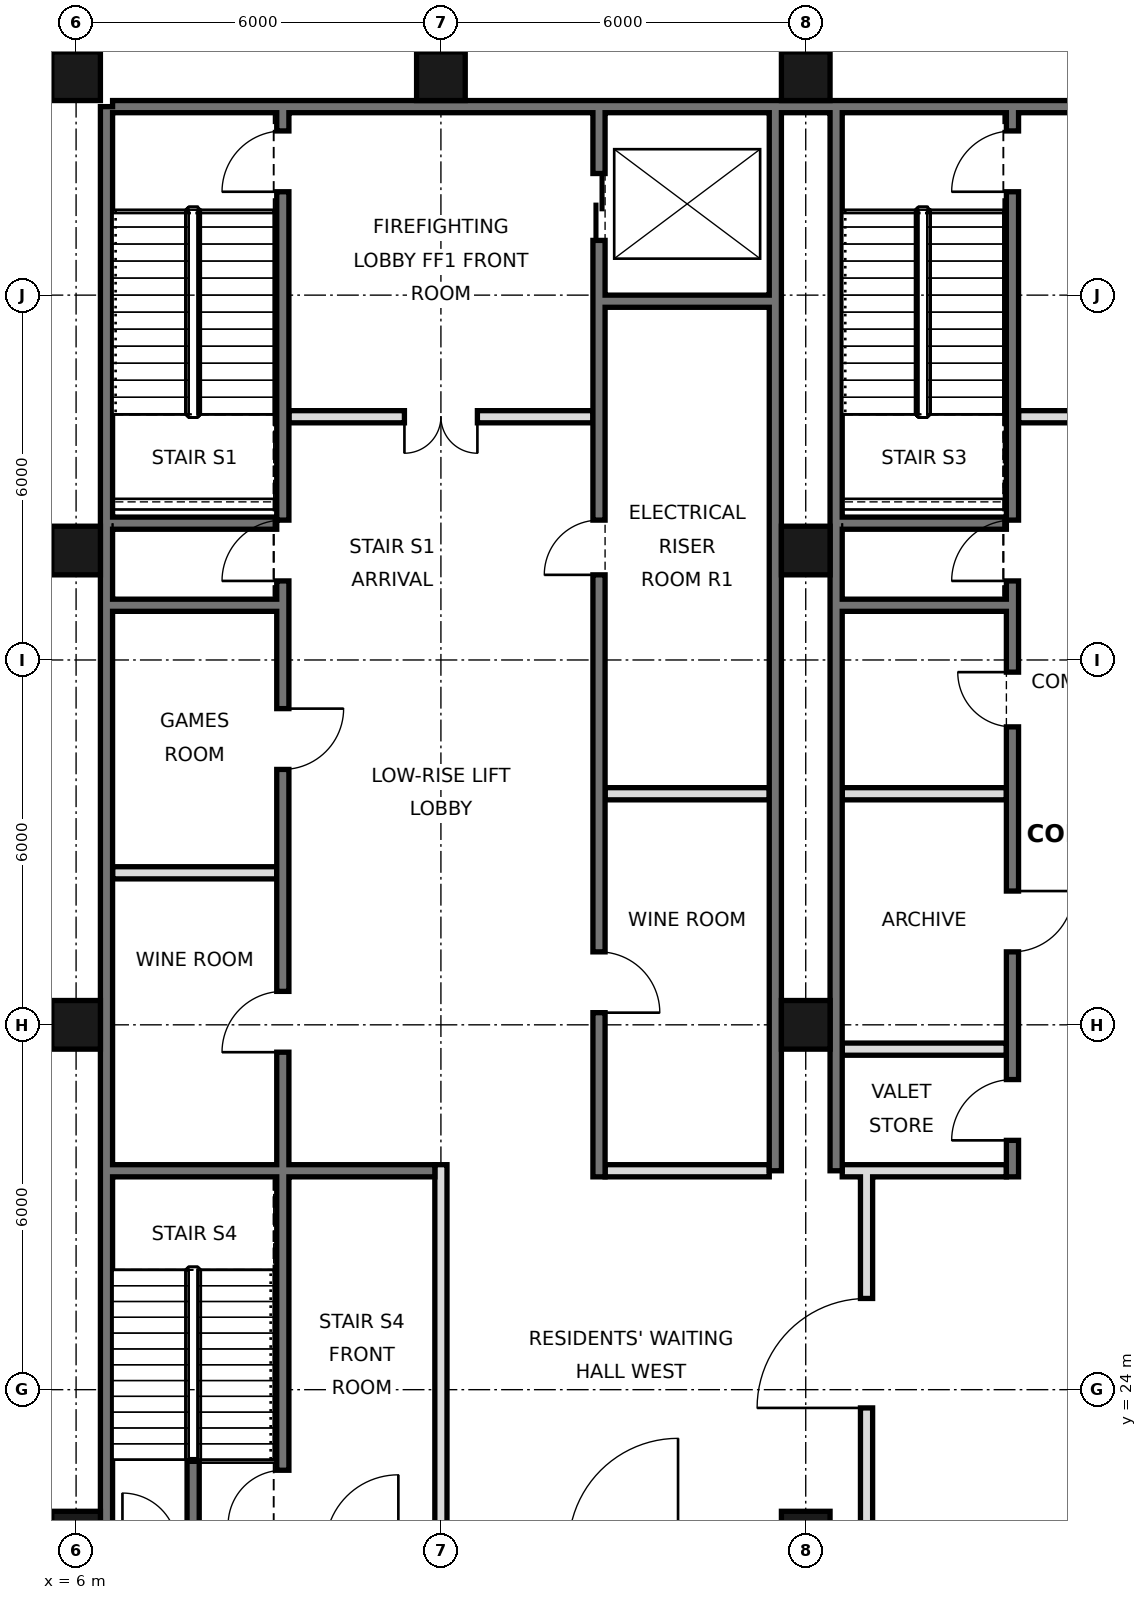
"""IFC4 building model, lengths in metres.
Left out: names, types, materials, properties, quantities, classifications, styles, units other than length and angle.
Written with IfcOpenShell. Run it as: python <this file> out.ifc"""

import sys

from ifc_helpers import new_model, si_unit, direction, frame, frame_2d, origin, origin_2d, place, context, subcontext, project, spatial, rectangle, hollow_rectangle, extrude, element, fill, save


model = new_model("IFC4")
c1 = context("Model", 3, precision=1e-05, world=origin(), true_north=direction((0.0, 1.0)))
c2 = subcontext(c1, "Body", "Model", "MODEL_VIEW")
j1 = project(units=[si_unit("LENGTHUNIT", "METRE"), si_unit("PLANEANGLEUNIT", "RADIAN")], contexts=[c1])
p1 = place(None, origin())
s1 = spatial("IfcSite", under=j1, at=p1, CompositionType="ELEMENT")
p2 = place(p1, origin())
s2 = spatial("IfcBuilding", under=s1, at=p2, CompositionType="ELEMENT")
p3 = place(p2, frame((0.0, 0.0, 281.8)))
s3 = spatial("IfcBuildingStorey", under=s2, at=p3, CompositionType="ELEMENT", Elevation=281.8)
for number, where, z_axis, x_axis in (
    (1, (6.0, 21.6, 0.0), (0.0, 0.0, 1.0), (1.0, 0.0, 0.0)),
    (2, (6.0, 30.0, 0.0), (0.0, 0.0, 1.0), (1.0, 0.0, 0.0)),
    (3, (6.0, 37.8, 0.0), (0.0, 0.0, 1.0), (1.0, 0.0, 0.0)),
    (4, (6.0, 45.6, 0.0), (0.0, 0.0, 1.0), (1.0, 0.0, 0.0)),
    (5, (12.0, 45.6, 0.0), (0.0, 0.0, 1.0), (1.0, 0.0, 0.0)),
    (6, (18.0, 21.6, 0.0), (0.0, 0.0, 1.0), (1.0, 0.0, 0.0)),
    (7, (18.0, 30.0, 0.0), (0.0, 0.0, 1.0), (1.0, 0.0, 0.0)),
    (8, (18.0, 37.8, 0.0), (0.0, 0.0, 1.0), (1.0, 0.0, 0.0)),
    (9, (18.0, 45.6, 0.0), (0.0, 0.0, 1.0), (1.0, 0.0, 0.0)),
):
    element("IfcColumn", number, at=place(p3, frame(where, z_axis=z_axis, x_axis=x_axis)), inside=s3, PredefinedType="COLUMN", context=c2, shape_type="SweptSolid", body=[
        extrude(hollow_rectangle(XDim=0.8, YDim=0.8, WallThickness=0.032, at=origin_2d()), origin(), (0.0, 0.0, 1.0), 9.0),
    ])
p4 = place(p3, frame((6.5, 21.6, 0.0), z_axis=(0.0, 0.0, 1.0), x_axis=(0.0, 1.0, 0.0)))
e10 = element("IfcWall", 10, at=p4, inside=s3, PredefinedType="SOLIDWALL", context=c2, shape_type="SweptSolid", body=[
    extrude(rectangle(XDim=23.5, YDim=0.2, at=frame_2d((11.75, 0.0))), origin(), (0.0, 0.0, 1.0), 8.7),
])
p5 = place(p3, frame((6.6, 45.1, 0.0), z_axis=(0.0, 0.0, 1.0), x_axis=(1.0, 0.0, 0.0)))
e11 = element("IfcWall", 11, at=p5, inside=s3, PredefinedType="SOLIDWALL", context=c2, shape_type="SweptSolid", body=[
    extrude(rectangle(XDim=34.8, YDim=0.2, at=frame_2d((17.4, 0.0))), origin(), (0.0, 0.0, 1.0), 8.7),
])
for number, where, z_axis, x_axis in (
    (12, (17.5, 27.6, 0.0), (0.0, 0.0, 1.0), (0.0, 1.0, 0.0)),
    (13, (18.5, 27.6, 0.0), (0.0, 0.0, 1.0), (0.0, 1.0, 0.0)),
):
    element("IfcWall", number, at=place(p3, frame(where, z_axis=z_axis, x_axis=x_axis)), inside=s3, PredefinedType="SOLIDWALL", context=c2, shape_type="SweptSolid", body=[
        extrude(rectangle(XDim=17.5, YDim=0.2, at=frame_2d((8.75, 0.0))), origin(), (0.0, 0.0, 1.0), 8.7),
    ])
p6 = place(p3, frame((19.0, 21.6, 0.0), z_axis=(0.0, 0.0, 1.0), x_axis=(0.0, 1.0, 0.0)))
e14 = element("IfcWall", 14, at=p6, inside=s3, PredefinedType="PARTITIONING", context=c2, shape_type="SweptSolid", body=[
    extrude(rectangle(XDim=6.0, YDim=0.2, at=frame_2d((3.0, 0.0))), origin(), (0.0, 0.0, 1.0), 8.7),
])
p7 = place(p6, frame((2.1, 0.0, 0.0)))
e15 = element("IfcOpeningElement", 15, at=p7, cuts=e14, PredefinedType="OPENING", context=c2, shape_type="SweptSolid", body=[
    extrude(rectangle(XDim=1.8, YDim=2.1, at=frame_2d((0.9, 1.05))), frame((0.0, 0.11, 0.0), z_axis=(0.0, -1.0, 0.0), x_axis=(1.0, 0.0, 0.0)), (0.0, 0.0, 1.0), 0.22),
])
p8 = place(p3, frame((12.0, 21.6, 0.0), z_axis=(0.0, 0.0, 1.0), x_axis=(0.0, 1.0, 0.0)))
e16 = element("IfcWall", 16, at=p8, inside=s3, PredefinedType="PARTITIONING", context=c2, shape_type="SweptSolid", body=[
    extrude(rectangle(XDim=6.1, YDim=0.2, at=frame_2d((3.05, 0.0))), origin(), (0.0, 0.0, 1.0), 8.7),
])
p9 = place(p3, frame((14.6, 27.5, 0.0), z_axis=(0.0, 0.0, 1.0), x_axis=(0.0, 1.0, 0.0)))
e17 = element("IfcWall", 17, at=p9, inside=s3, PredefinedType="SOLIDWALL", context=c2, shape_type="SweptSolid", body=[
    extrude(rectangle(XDim=17.5, YDim=0.2, at=frame_2d((8.75, 0.0))), origin(), (0.0, 0.0, 1.0), 8.7),
])
p10 = place(p9, frame((15.4, 0.0, 0.0)))
e18 = element("IfcOpeningElement", 18, at=p10, cuts=e17, PredefinedType="OPENING", context=c2, shape_type="SweptSolid", body=[
    extrude(rectangle(XDim=1.1, YDim=2.1, at=frame_2d((0.55, 1.05))), frame((0.0, 0.11, 0.0), z_axis=(0.0, -1.0, 0.0), x_axis=(1.0, 0.0, 0.0)), (0.0, 0.0, 1.0), 0.22),
])
p11 = place(p9, frame((2.7, 0.0, 0.0)))
e19 = element("IfcOpeningElement", 19, at=p11, cuts=e17, PredefinedType="OPENING", context=c2, shape_type="SweptSolid", body=[
    extrude(rectangle(XDim=1.0, YDim=2.1, at=frame_2d((0.5, 1.05))), frame((0.0, 0.11, 0.0), z_axis=(0.0, -1.0, 0.0), x_axis=(1.0, 0.0, 0.0)), (0.0, 0.0, 1.0), 0.22),
])
p12 = place(p9, frame((9.9, 0.0, 0.0)))
e20 = element("IfcOpeningElement", 20, at=p12, cuts=e17, PredefinedType="OPENING", context=c2, shape_type="SweptSolid", body=[
    extrude(rectangle(XDim=0.9, YDim=2.1, at=frame_2d((0.45, 1.05))), frame((0.0, 0.11, 0.0), z_axis=(0.0, -1.0, 0.0), x_axis=(1.0, 0.0, 0.0)), (0.0, 0.0, 1.0), 0.22),
])
p13 = place(p3, frame((21.4, 27.5, 0.0), z_axis=(0.0, 0.0, 1.0), x_axis=(0.0, 1.0, 0.0)))
e21 = element("IfcWall", 21, at=p13, inside=s3, PredefinedType="SOLIDWALL", context=c2, shape_type="SweptSolid", body=[
    extrude(rectangle(XDim=17.5, YDim=0.2, at=frame_2d((8.75, 0.0))), origin(), (0.0, 0.0, 1.0), 8.7),
])
p14 = place(p13, frame((0.6, 0.0, 0.0)))
e22 = element("IfcOpeningElement", 22, at=p14, cuts=e21, PredefinedType="OPENING", context=c2, shape_type="SweptSolid", body=[
    extrude(rectangle(XDim=1.0, YDim=2.1, at=frame_2d((0.5, 1.05))), frame((0.0, 0.11, 0.0), z_axis=(0.0, -1.0, 0.0), x_axis=(1.0, 0.0, 0.0)), (0.0, 0.0, 1.0), 0.22),
])
p15 = place(p13, frame((3.7, 0.0, 0.0)))
e23 = element("IfcOpeningElement", 23, at=p15, cuts=e21, PredefinedType="OPENING", context=c2, shape_type="SweptSolid", body=[
    extrude(rectangle(XDim=1.0, YDim=2.1, at=frame_2d((0.5, 1.05))), frame((0.0, 0.11, 0.0), z_axis=(0.0, -1.0, 0.0), x_axis=(1.0, 0.0, 0.0)), (0.0, 0.0, 1.0), 0.22),
])
p16 = place(p13, frame((9.8, 0.0, 0.0)))
e24 = element("IfcOpeningElement", 24, at=p16, cuts=e21, PredefinedType="OPENING", context=c2, shape_type="SweptSolid", body=[
    extrude(rectangle(XDim=1.0, YDim=2.1, at=frame_2d((0.5, 1.05))), frame((0.0, 0.11, 0.0), z_axis=(0.0, -1.0, 0.0), x_axis=(1.0, 0.0, 0.0)), (0.0, 0.0, 1.0), 0.22),
])
p17 = place(p13, frame((16.2, 0.0, 0.0)))
e25 = element("IfcOpeningElement", 25, at=p17, cuts=e21, PredefinedType="OPENING", context=c2, shape_type="SweptSolid", body=[
    extrude(rectangle(XDim=1.0, YDim=2.1, at=frame_2d((0.5, 1.05))), frame((0.0, 0.11, 0.0), z_axis=(0.0, -1.0, 0.0), x_axis=(1.0, 0.0, 0.0)), (0.0, 0.0, 1.0), 0.22),
])
p18 = place(p13, frame((7.4, 0.0, 0.0)))
e26 = element("IfcOpeningElement", 26, at=p18, cuts=e21, PredefinedType="OPENING", context=c2, shape_type="SweptSolid", body=[
    extrude(rectangle(XDim=0.9, YDim=2.1, at=frame_2d((0.45, 1.05))), frame((0.0, 0.11, 0.0), z_axis=(0.0, -1.0, 0.0), x_axis=(1.0, 0.0, 0.0)), (0.0, 0.0, 1.0), 0.22),
])
p19 = place(p3, frame((7.925, 21.6, 0.0), z_axis=(0.0, 0.0, 1.0), x_axis=(0.0, 1.0, 0.0)))
e27 = element("IfcWall", 27, at=p19, inside=s3, PredefinedType="SOLIDWALL", context=c2, shape_type="SweptSolid", body=[
    extrude(rectangle(XDim=1.25, YDim=0.2, at=frame_2d((0.625, 0.0))), origin(), (0.0, 0.0, 1.0), 8.7),
])
p20 = place(p3, frame((9.4, 21.6, 0.0), z_axis=(0.0, 0.0, 1.0), x_axis=(0.0, 1.0, 0.0)))
e28 = element("IfcWall", 28, at=p20, inside=s3, PredefinedType="SOLIDWALL", context=c2, shape_type="SweptSolid", body=[
    extrude(rectangle(XDim=23.4, YDim=0.2, at=frame_2d((11.7, 0.0))), origin(), (0.0, 0.0, 1.0), 8.7),
])
p21 = place(p20, frame((7.95, 0.0, 0.0)))
e29 = element("IfcOpeningElement", 29, at=p21, cuts=e28, PredefinedType="OPENING", context=c2, shape_type="SweptSolid", body=[
    extrude(rectangle(XDim=1.0, YDim=2.1, at=frame_2d((0.5, 1.05))), frame((0.0, 0.11, 0.0), z_axis=(0.0, -1.0, 0.0), x_axis=(1.0, 0.0, 0.0)), (0.0, 0.0, 1.0), 0.22),
])
p22 = place(p20, frame((12.6, 0.0, 0.0)))
e30 = element("IfcOpeningElement", 30, at=p22, cuts=e28, PredefinedType="OPENING", context=c2, shape_type="SweptSolid", body=[
    extrude(rectangle(XDim=1.0, YDim=2.1, at=frame_2d((0.5, 1.05))), frame((0.0, 0.11, 0.0), z_axis=(0.0, -1.0, 0.0), x_axis=(1.0, 0.0, 0.0)), (0.0, 0.0, 1.0), 0.22),
])
p23 = place(p20, frame((15.7, 0.0, 0.0)))
e31 = element("IfcOpeningElement", 31, at=p23, cuts=e28, PredefinedType="OPENING", context=c2, shape_type="SweptSolid", body=[
    extrude(rectangle(XDim=1.0, YDim=2.1, at=frame_2d((0.5, 1.05))), frame((0.0, 0.11, 0.0), z_axis=(0.0, -1.0, 0.0), x_axis=(1.0, 0.0, 0.0)), (0.0, 0.0, 1.0), 0.22),
])
p24 = place(p20, frame((22.1, 0.0, 0.0)))
e32 = element("IfcOpeningElement", 32, at=p24, cuts=e28, PredefinedType="OPENING", context=c2, shape_type="SweptSolid", body=[
    extrude(rectangle(XDim=1.0, YDim=2.1, at=frame_2d((0.5, 1.05))), frame((0.0, 0.11, 0.0), z_axis=(0.0, -1.0, 0.0), x_axis=(1.0, 0.0, 0.0)), (0.0, 0.0, 1.0), 0.22),
])
p25 = place(p20, frame((0.175, 0.0, 0.0)))
e33 = element("IfcOpeningElement", 33, at=p25, cuts=e28, PredefinedType="OPENING", context=c2, shape_type="SweptSolid", body=[
    extrude(rectangle(XDim=0.9, YDim=2.1, at=frame_2d((0.45, 1.05))), frame((0.0, 0.11, 0.0), z_axis=(0.0, -1.0, 0.0), x_axis=(1.0, 0.0, 0.0)), (0.0, 0.0, 1.0), 0.22),
])
for number, where, z_axis, x_axis in (
    (34, (14.7, 27.6, 0.0), (0.0, 0.0, 1.0), (1.0, 0.0, 0.0)),
    (35, (18.6, 27.6, 0.0), (0.0, 0.0, 1.0), (1.0, 0.0, 0.0)),
):
    element("IfcWall", number, at=place(p3, frame(where, z_axis=z_axis, x_axis=x_axis)), inside=s3, PredefinedType="PARTITIONING", context=c2, shape_type="SweptSolid", body=[
        extrude(rectangle(XDim=2.7, YDim=0.2, at=frame_2d((1.35, 0.0))), origin(), (0.0, 0.0, 1.0), 8.7),
    ])
p26 = place(p3, frame((6.6, 27.6, 0.0), z_axis=(0.0, 0.0, 1.0), x_axis=(1.0, 0.0, 0.0)))
e36 = element("IfcWall", 36, at=p26, inside=s3, PredefinedType="SOLIDWALL", context=c2, shape_type="SweptSolid", body=[
    extrude(rectangle(XDim=5.3, YDim=0.2, at=frame_2d((2.65, 0.0))), origin(), (0.0, 0.0, 1.0), 8.7),
])
for number, where, z_axis, x_axis in (
    (37, (18.6, 29.6, 0.0), (0.0, 0.0, 1.0), (1.0, 0.0, 0.0)),
    (38, (6.6, 32.5, 0.0), (0.0, 0.0, 1.0), (1.0, 0.0, 0.0)),
):
    element("IfcWall", number, at=place(p3, frame(where, z_axis=z_axis, x_axis=x_axis)), inside=s3, PredefinedType="PARTITIONING", context=c2, shape_type="SweptSolid", body=[
        extrude(rectangle(XDim=2.7, YDim=0.2, at=frame_2d((1.35, 0.0))), origin(), (0.0, 0.0, 1.0), 8.7),
    ])
for number, where, z_axis, x_axis in (
    (39, (14.7, 33.8, 0.0), (0.0, 0.0, 1.0), (1.0, 0.0, 0.0)),
    (40, (18.6, 33.8, 0.0), (0.0, 0.0, 1.0), (1.0, 0.0, 0.0)),
    (41, (18.6, 36.9, 0.0), (0.0, 0.0, 1.0), (1.0, 0.0, 0.0)),
    (42, (6.6, 36.9, 0.0), (0.0, 0.0, 1.0), (1.0, 0.0, 0.0)),
):
    element("IfcWall", number, at=place(p3, frame(where, z_axis=z_axis, x_axis=x_axis)), inside=s3, PredefinedType="SOLIDWALL", context=c2, shape_type="SweptSolid", body=[
        extrude(rectangle(XDim=2.7, YDim=0.2, at=frame_2d((1.35, 0.0))), origin(), (0.0, 0.0, 1.0), 8.7),
    ])
for number, where, z_axis, x_axis in (
    (43, (18.6, 38.25, 0.0), (0.0, 0.0, 1.0), (1.0, 0.0, 0.0)),
    (44, (6.6, 38.25, 0.0), (0.0, 0.0, 1.0), (1.0, 0.0, 0.0)),
):
    element("IfcWall", number, at=place(p3, frame(where, z_axis=z_axis, x_axis=x_axis)), inside=s3, PredefinedType="SOLIDWALL", context=c2, shape_type="SweptSolid", body=[
        extrude(rectangle(XDim=2.7, YDim=0.2, at=frame_2d((1.35, 0.0))), origin(), (0.0, 0.0, 1.0), 4.3),
    ])
p27 = place(p3, frame((21.5, 40.0, 0.0), z_axis=(0.0, 0.0, 1.0), x_axis=(1.0, 0.0, 0.0)))
e45 = element("IfcWall", 45, at=p27, inside=s3, PredefinedType="PARTITIONING", context=c2, shape_type="SweptSolid", body=[
    extrude(rectangle(XDim=5.0, YDim=0.2, at=frame_2d((2.5, 0.0))), origin(), (0.0, 0.0, 1.0), 8.7),
])
p28 = place(p27, frame((1.9, 0.0, 0.0)))
e46 = element("IfcOpeningElement", 46, at=p28, cuts=e45, PredefinedType="OPENING", context=c2, shape_type="SweptSolid", body=[
    extrude(rectangle(XDim=1.2, YDim=2.1, at=frame_2d((0.6, 1.05))), frame((0.0, 0.11, 0.0), z_axis=(0.0, -1.0, 0.0), x_axis=(1.0, 0.0, 0.0)), (0.0, 0.0, 1.0), 0.22),
])
p29 = place(p3, frame((9.5, 40.0, 0.0), z_axis=(0.0, 0.0, 1.0), x_axis=(1.0, 0.0, 0.0)))
e47 = element("IfcWall", 47, at=p29, inside=s3, PredefinedType="PARTITIONING", context=c2, shape_type="SweptSolid", body=[
    extrude(rectangle(XDim=5.0, YDim=0.2, at=frame_2d((2.5, 0.0))), origin(), (0.0, 0.0, 1.0), 8.7),
])
p30 = place(p29, frame((1.9, 0.0, 0.0)))
e48 = element("IfcOpeningElement", 48, at=p30, cuts=e47, PredefinedType="OPENING", context=c2, shape_type="SweptSolid", body=[
    extrude(rectangle(XDim=1.2, YDim=2.1, at=frame_2d((0.6, 1.05))), frame((0.0, 0.11, 0.0), z_axis=(0.0, -1.0, 0.0), x_axis=(1.0, 0.0, 0.0)), (0.0, 0.0, 1.0), 0.22),
])
p31 = place(p3, frame((14.7, 41.9, 0.0), z_axis=(0.0, 0.0, 1.0), x_axis=(1.0, 0.0, 0.0)))
e49 = element("IfcWall", 49, at=p31, inside=s3, PredefinedType="SOLIDWALL", context=c2, shape_type="SweptSolid", body=[
    extrude(rectangle(XDim=2.7, YDim=0.2, at=frame_2d((1.35, 0.0))), origin(), (0.0, 0.0, 1.0), 8.7),
])
p32 = place(p7, origin())
e50 = element("IfcDoor", 50, at=p32, inside=s3, OperationType="SINGLE_SWING_LEFT", PredefinedType="DOOR", context=c2, shape_type="SweptSolid", body=[
    extrude(rectangle(XDim=1.8, YDim=2.1, at=frame_2d((0.9, 1.05))), frame((0.0, 0.025, 0.0), z_axis=(0.0, -1.0, 0.0), x_axis=(1.0, 0.0, 0.0)), (0.0, 0.0, 1.0), 0.05),
])
fill(e15, e50)
p33 = place(p30, frame((1.2, 0.0, 0.0), z_axis=(0.0, 0.0, 1.0), x_axis=(-1.0, 0.0, 0.0)))
e51 = element("IfcDoor", 51, at=p33, inside=s3, OperationType="DOUBLE_DOOR_SINGLE_SWING", PredefinedType="DOOR", context=c2, shape_type="SweptSolid", body=[
    extrude(rectangle(XDim=1.2, YDim=2.1, at=frame_2d((0.6, 1.05))), frame((0.0, 0.025, 0.0), z_axis=(0.0, -1.0, 0.0), x_axis=(1.0, 0.0, 0.0)), (0.0, 0.0, 1.0), 0.05),
])
fill(e48, e51)
p34 = place(p10, origin())
e52 = element("IfcDoor", 52, at=p34, inside=s3, OperationType="DOUBLE_DOOR_SLIDING", PredefinedType="DOOR", context=c2, shape_type="SweptSolid", body=[
    extrude(rectangle(XDim=1.1, YDim=2.1, at=frame_2d((0.55, 1.05))), frame((0.0, 0.025, 0.0), z_axis=(0.0, -1.0, 0.0), x_axis=(1.0, 0.0, 0.0)), (0.0, 0.0, 1.0), 0.05),
])
fill(e18, e52)
p35 = place(p14, origin())
e53 = element("IfcDoor", 53, at=p35, inside=s3, OperationType="SINGLE_SWING_LEFT", PredefinedType="DOOR", context=c2, shape_type="SweptSolid", body=[
    extrude(rectangle(XDim=1.0, YDim=2.1, at=frame_2d((0.5, 1.05))), frame((0.0, 0.025, 0.0), z_axis=(0.0, -1.0, 0.0), x_axis=(1.0, 0.0, 0.0)), (0.0, 0.0, 1.0), 0.05),
])
fill(e22, e53)
p36 = place(p15, origin())
e54 = element("IfcDoor", 54, at=p36, inside=s3, OperationType="SINGLE_SWING_RIGHT", PredefinedType="DOOR", context=c2, shape_type="SweptSolid", body=[
    extrude(rectangle(XDim=1.0, YDim=2.1, at=frame_2d((0.5, 1.05))), frame((0.0, 0.025, 0.0), z_axis=(0.0, -1.0, 0.0), x_axis=(1.0, 0.0, 0.0)), (0.0, 0.0, 1.0), 0.05),
])
fill(e23, e54)
p37 = place(p11, frame((1.0, 0.0, 0.0), z_axis=(0.0, 0.0, 1.0), x_axis=(-1.0, 0.0, 0.0)))
e55 = element("IfcDoor", 55, at=p37, inside=s3, OperationType="SINGLE_SWING_RIGHT", PredefinedType="DOOR", context=c2, shape_type="SweptSolid", body=[
    extrude(rectangle(XDim=1.0, YDim=2.1, at=frame_2d((0.5, 1.05))), frame((0.0, 0.025, 0.0), z_axis=(0.0, -1.0, 0.0), x_axis=(1.0, 0.0, 0.0)), (0.0, 0.0, 1.0), 0.05),
])
fill(e19, e55)
p38 = place(p21, origin())
e56 = element("IfcDoor", 56, at=p38, inside=s3, OperationType="SINGLE_SWING_LEFT", PredefinedType="DOOR", context=c2, shape_type="SweptSolid", body=[
    extrude(rectangle(XDim=1.0, YDim=2.1, at=frame_2d((0.5, 1.05))), frame((0.0, 0.025, 0.0), z_axis=(0.0, -1.0, 0.0), x_axis=(1.0, 0.0, 0.0)), (0.0, 0.0, 1.0), 0.05),
])
fill(e29, e56)
p39 = place(p22, origin())
e57 = element("IfcDoor", 57, at=p39, inside=s3, OperationType="SINGLE_SWING_RIGHT", PredefinedType="DOOR", context=c2, shape_type="SweptSolid", body=[
    extrude(rectangle(XDim=1.0, YDim=2.1, at=frame_2d((0.5, 1.05))), frame((0.0, 0.025, 0.0), z_axis=(0.0, -1.0, 0.0), x_axis=(1.0, 0.0, 0.0)), (0.0, 0.0, 1.0), 0.05),
])
fill(e30, e57)
p40 = place(p23, origin())
e58 = element("IfcDoor", 58, at=p40, inside=s3, OperationType="SINGLE_SWING_LEFT", PredefinedType="DOOR", context=c2, shape_type="SweptSolid", body=[
    extrude(rectangle(XDim=1.0, YDim=2.1, at=frame_2d((0.5, 1.05))), frame((0.0, 0.025, 0.0), z_axis=(0.0, -1.0, 0.0), x_axis=(1.0, 0.0, 0.0)), (0.0, 0.0, 1.0), 0.05),
])
fill(e31, e58)
p41 = place(p24, origin())
e59 = element("IfcDoor", 59, at=p41, inside=s3, OperationType="SINGLE_SWING_LEFT", PredefinedType="DOOR", context=c2, shape_type="SweptSolid", body=[
    extrude(rectangle(XDim=1.0, YDim=2.1, at=frame_2d((0.5, 1.05))), frame((0.0, 0.025, 0.0), z_axis=(0.0, -1.0, 0.0), x_axis=(1.0, 0.0, 0.0)), (0.0, 0.0, 1.0), 0.05),
])
fill(e32, e59)
p42 = place(p16, origin())
e60 = element("IfcDoor", 60, at=p42, inside=s3, OperationType="SINGLE_SWING_LEFT", PredefinedType="DOOR", context=c2, shape_type="SweptSolid", body=[
    extrude(rectangle(XDim=1.0, YDim=2.1, at=frame_2d((0.5, 1.05))), frame((0.0, 0.025, 0.0), z_axis=(0.0, -1.0, 0.0), x_axis=(1.0, 0.0, 0.0)), (0.0, 0.0, 1.0), 0.05),
])
fill(e24, e60)
p43 = place(p17, origin())
e61 = element("IfcDoor", 61, at=p43, inside=s3, OperationType="SINGLE_SWING_LEFT", PredefinedType="DOOR", context=c2, shape_type="SweptSolid", body=[
    extrude(rectangle(XDim=1.0, YDim=2.1, at=frame_2d((0.5, 1.05))), frame((0.0, 0.025, 0.0), z_axis=(0.0, -1.0, 0.0), x_axis=(1.0, 0.0, 0.0)), (0.0, 0.0, 1.0), 0.05),
])
fill(e25, e61)
p44 = place(p25, origin())
e62 = element("IfcDoor", 62, at=p44, inside=s3, OperationType="SINGLE_SWING_LEFT", PredefinedType="DOOR", context=c2, shape_type="SweptSolid", body=[
    extrude(rectangle(XDim=0.9, YDim=2.1, at=frame_2d((0.45, 1.05))), frame((0.0, 0.025, 0.0), z_axis=(0.0, -1.0, 0.0), x_axis=(1.0, 0.0, 0.0)), (0.0, 0.0, 1.0), 0.05),
])
fill(e33, e62)
p45 = place(p12, origin())
e63 = element("IfcDoor", 63, at=p45, inside=s3, OperationType="SINGLE_SWING_LEFT", PredefinedType="DOOR", context=c2, shape_type="SweptSolid", body=[
    extrude(rectangle(XDim=0.9, YDim=2.1, at=frame_2d((0.45, 1.05))), frame((0.0, 0.025, 0.0), z_axis=(0.0, -1.0, 0.0), x_axis=(1.0, 0.0, 0.0)), (0.0, 0.0, 1.0), 0.05),
])
fill(e20, e63)
p46 = place(p18, frame((0.9, 0.0, 0.0), z_axis=(0.0, 0.0, 1.0), x_axis=(-1.0, 0.0, 0.0)))
e64 = element("IfcDoor", 64, at=p46, inside=s3, OperationType="SINGLE_SWING_LEFT", PredefinedType="DOOR", context=c2, shape_type="SweptSolid", body=[
    extrude(rectangle(XDim=0.9, YDim=2.1, at=frame_2d((0.45, 1.05))), frame((0.0, 0.025, 0.0), z_axis=(0.0, -1.0, 0.0), x_axis=(1.0, 0.0, 0.0)), (0.0, 0.0, 1.0), 0.05),
])
fill(e26, e64)
save(model, sys.argv[1])
